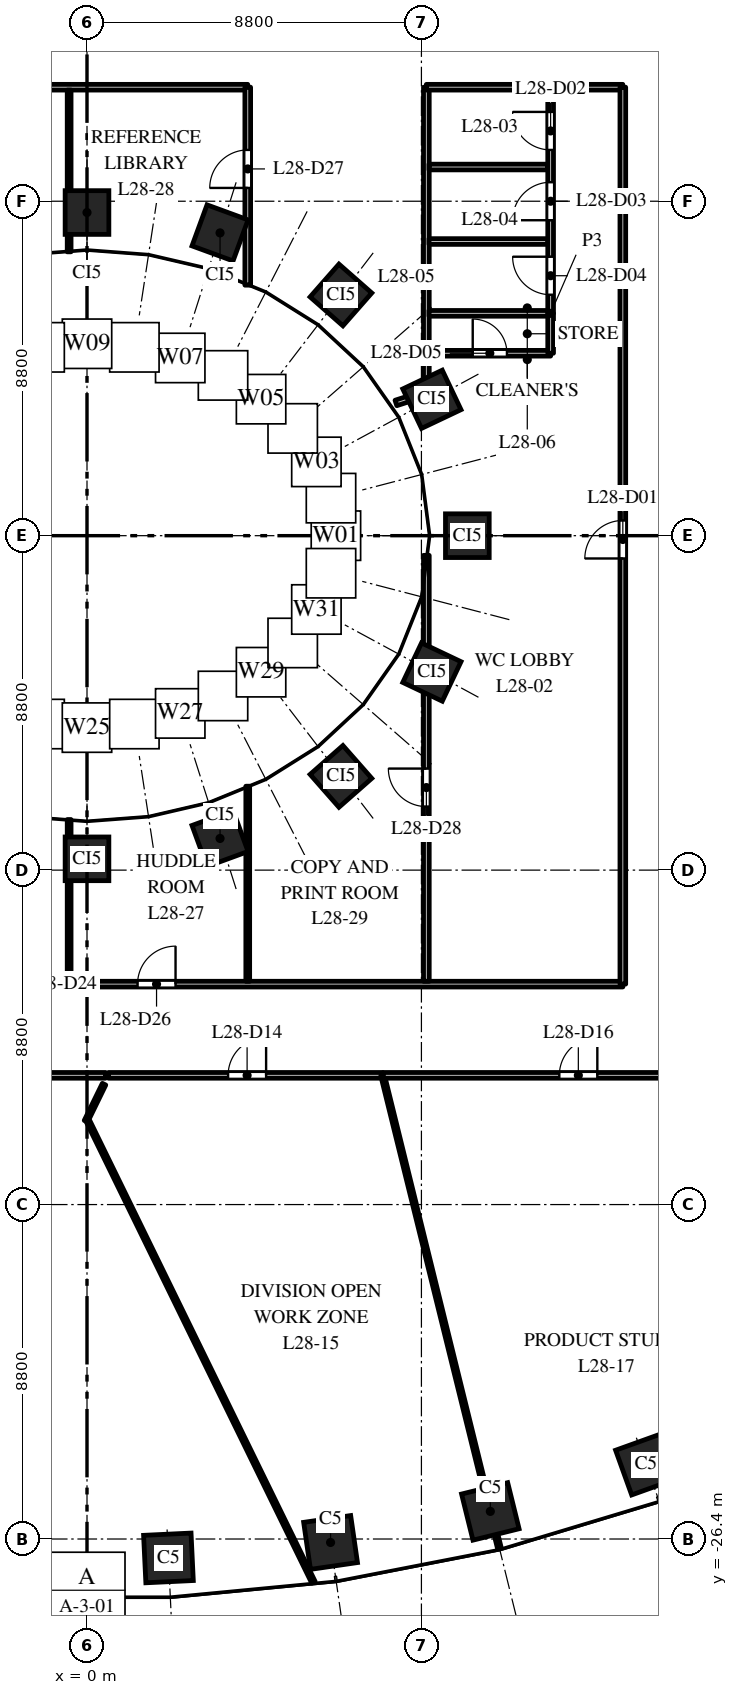
"""IFC4 building model, lengths in metres.
Left out: names, types, materials, properties, quantities, classifications, styles, units other than length and angle.
Written with IfcOpenShell. Run it as: python <this file> out.ifc"""

import sys

from ifc_helpers import new_model, si_unit, direction, frame, frame_2d, origin, origin_2d, place, context, subcontext, project, spatial, rectangle, extrude, element, fill, save


model = new_model("IFC4")
c1 = context("Model", 3, precision=1e-05, world=origin(), true_north=direction((0.0, 1.0)))
c2 = subcontext(c1, "Body", "Model", "MODEL_VIEW")
j1 = project(units=[si_unit("LENGTHUNIT", "METRE"), si_unit("PLANEANGLEUNIT", "RADIAN")], contexts=[c1])
p1 = place(None, origin())
s1 = spatial("IfcSite", under=j1, at=p1, CompositionType="ELEMENT")
p2 = place(p1, origin())
s2 = spatial("IfcBuilding", under=s1, at=p2, CompositionType="ELEMENT")
p3 = place(p2, frame((0.0, 0.0, 124.0)))
s3 = spatial("IfcBuildingStorey", under=s2, at=p3, CompositionType="ELEMENT", Elevation=124.0)
for number, where, z_axis, x_axis in (
    (1, (2.143, -26.898, 0.0), (0.0, 0.0, 1.0), (0.999, 0.048, 0.0)),
    (2, (6.409, -26.491, 0.0), (0.0, 0.0, 1.0), (0.99, 0.143, 0.0)),
    (3, (10.613, -25.674, 0.0), (0.0, 0.0, 1.0), (0.971, 0.24, 0.0)),
    (4, (14.709, -24.441, 0.0), (0.0, 0.0, 1.0), (0.941, 0.338, 0.0)),
):
    element("IfcColumn", number, at=place(p3, frame(where, z_axis=z_axis, x_axis=x_axis)), inside=s3, PredefinedType="COLUMN", context=c2, shape_type="SweptSolid", body=[
        extrude(rectangle(XDim=1.25, YDim=1.25, at=origin_2d()), origin(), (0.0, 0.0, 1.0), 4.0),
    ])
for number, where, z_axis, x_axis in (
    (5, (10.008, 0.0, 0.0), (0.0, 0.0, 1.0), (0.0, 1.0, 0.0)),
    (6, (9.076, 3.588, 0.0), (0.0, 0.0, 1.0), (-0.429, 0.903, 0.0)),
    (7, (6.682, 6.334, 0.0), (0.0, 0.0, 1.0), (-0.751, 0.66, 0.0)),
    (8, (3.501, 7.967, 0.0), (0.0, 0.0, 1.0), (-0.939, 0.344, 0.0)),
    (9, (0.0, 8.503, 0.0), (0.0, 0.0, 1.0), (-1.0, 0.0, 0.0)),
    (10, (0.0, -8.503, 0.0), (0.0, 0.0, 1.0), (1.0, 0.0, 0.0)),
    (11, (3.501, -7.967, 0.0), (0.0, 0.0, 1.0), (0.939, 0.344, 0.0)),
    (12, (6.682, -6.334, 0.0), (0.0, 0.0, 1.0), (0.751, 0.66, 0.0)),
    (13, (9.076, -3.588, 0.0), (0.0, 0.0, 1.0), (0.429, 0.903, 0.0)),
):
    element("IfcColumn", number, at=place(p3, frame(where, z_axis=z_axis, x_axis=x_axis)), inside=s3, PredefinedType="COLUMN", context=c2, shape_type="SweptSolid", body=[
        extrude(rectangle(XDim=1.15, YDim=1.15, at=origin_2d()), origin(), (0.0, 0.0, 1.0), 4.0),
    ])
p4 = place(p3, frame((-14.1, -11.8, 0.0), z_axis=(0.0, 0.0, 1.0), x_axis=(1.0, 0.0, 0.0)))
e14 = element("IfcWall", 14, at=p4, inside=s3, PredefinedType="PARTITIONING", context=c2, shape_type="SweptSolid", body=[
    extrude(rectangle(XDim=28.2, YDim=0.15, at=frame_2d((14.1, 0.0))), origin(), (0.0, 0.0, 1.0), 2.85),
])
p5 = place(p4, frame((6.03, 0.0, 0.0)))
e15 = element("IfcOpeningElement", 15, at=p5, cuts=e14, PredefinedType="OPENING", context=c2, shape_type="SweptSolid", body=[
    extrude(rectangle(XDim=1.0, YDim=2.1, at=frame_2d((0.5, 1.05))), frame((0.0, 0.085, 0.0), z_axis=(0.0, -1.0, 0.0), x_axis=(1.0, 0.0, 0.0)), (0.0, 0.0, 1.0), 0.17),
])
p6 = place(p4, frame((10.73, 0.0, 0.0)))
e16 = element("IfcOpeningElement", 16, at=p6, cuts=e14, PredefinedType="OPENING", context=c2, shape_type="SweptSolid", body=[
    extrude(rectangle(XDim=1.0, YDim=2.1, at=frame_2d((0.5, 1.05))), frame((0.0, 0.085, 0.0), z_axis=(0.0, -1.0, 0.0), x_axis=(1.0, 0.0, 0.0)), (0.0, 0.0, 1.0), 0.17),
])
p7 = place(p4, frame((15.43, 0.0, 0.0)))
e17 = element("IfcOpeningElement", 17, at=p7, cuts=e14, PredefinedType="OPENING", context=c2, shape_type="SweptSolid", body=[
    extrude(rectangle(XDim=1.0, YDim=2.1, at=frame_2d((0.5, 1.05))), frame((0.0, 0.085, 0.0), z_axis=(0.0, -1.0, 0.0), x_axis=(1.0, 0.0, 0.0)), (0.0, 0.0, 1.0), 0.17),
])
p8 = place(p3, frame((-14.1, 11.8, 0.0), z_axis=(0.0, 0.0, 1.0), x_axis=(1.0, 0.0, 0.0)))
e18 = element("IfcWall", 18, at=p8, inside=s3, PredefinedType="PARTITIONING", context=c2, shape_type="SweptSolid", body=[
    extrude(rectangle(XDim=18.33, YDim=0.15, at=frame_2d((9.165, 0.0))), origin(), (0.0, 0.0, 1.0), 2.85),
])
p9 = place(p8, frame((10.83, 0.0, 0.0)))
e19 = element("IfcOpeningElement", 19, at=p9, cuts=e18, PredefinedType="OPENING", context=c2, shape_type="SweptSolid", body=[
    extrude(rectangle(XDim=1.0, YDim=2.1, at=frame_2d((0.5, 1.05))), frame((0.0, 0.085, 0.0), z_axis=(0.0, -1.0, 0.0), x_axis=(1.0, 0.0, 0.0)), (0.0, 0.0, 1.0), 0.17),
])
p10 = place(p3, frame((-10.974, -14.2, 0.0), z_axis=(0.0, 0.0, 1.0), x_axis=(1.0, 0.0, 0.0)))
e20 = element("IfcWall", 20, at=p10, inside=s3, PredefinedType="PARTITIONING", context=c2, shape_type="SweptSolid", body=[
    extrude(rectangle(XDim=11.462, YDim=0.15, at=frame_2d((5.731, 0.0))), origin(), (0.0, 0.0, 1.0), 2.85),
])
p11 = place(p10, frame((7.913, 0.0, 0.0)))
e21 = element("IfcOpeningElement", 21, at=p11, cuts=e20, PredefinedType="OPENING", context=c2, shape_type="SweptSolid", body=[
    extrude(rectangle(XDim=1.0, YDim=2.1, at=frame_2d((0.5, 1.05))), frame((0.0, 0.085, 0.0), z_axis=(0.0, -1.0, 0.0), x_axis=(1.0, 0.0, 0.0)), (0.0, 0.0, 1.0), 0.17),
])
p12 = place(p10, frame((2.835, 0.0, 0.0)))
e22 = element("IfcOpeningElement", 22, at=p12, cuts=e20, PredefinedType="OPENING", context=c2, shape_type="SweptSolid", body=[
    extrude(rectangle(XDim=1.0, YDim=2.1, at=frame_2d((0.5, 1.05))), frame((0.0, 0.085, 0.0), z_axis=(0.0, -1.0, 0.0), x_axis=(1.0, 0.0, 0.0)), (0.0, 0.0, 1.0), 0.17),
])
for number, where, z_axis, x_axis in (
    (23, (-0.47, -11.725, 0.0), (0.0, 0.0, 1.0), (0.0, 1.0, 0.0)),
    (24, (-0.47, 7.469, 0.0), (0.0, 0.0, 1.0), (0.0, 1.0, 0.0)),
):
    element("IfcWall", number, at=place(p3, frame(where, z_axis=z_axis, x_axis=x_axis)), inside=s3, PredefinedType="PARTITIONING", context=c2, shape_type="SweptSolid", body=[
        extrude(rectangle(XDim=4.256, YDim=0.1, at=frame_2d((2.128, 0.0))), origin(), (0.0, 0.0, 1.0), 2.9),
    ])
p13 = place(p3, frame((-0.028, -15.409, 0.0), z_axis=(0.0, 0.0, 1.0), x_axis=(0.438750971543, 0.898608694021, 0.0)))
e25 = element("IfcWall", 25, at=p13, inside=s3, PredefinedType="PARTITIONING", context=c2, shape_type="SweptSolid", body=[
    extrude(rectangle(XDim=1.087, YDim=0.1, at=frame_2d((0.544, 0.0))), origin(), (0.0, 0.0, 1.0), 3.7),
])
p14 = place(p3, frame((0.028, -15.409, 0.0), z_axis=(0.0, 0.0, 1.0), x_axis=(0.439217591491, -0.898380714021, 0.0)))
e26 = element("IfcWall", 26, at=p14, inside=s3, PredefinedType="PARTITIONING", context=c2, shape_type="SweptSolid", body=[
    extrude(rectangle(XDim=13.501, YDim=0.1, at=frame_2d((6.75, 0.0))), origin(), (0.0, 0.0, 1.0), 2.9),
])
p15 = place(p3, frame((0.563, -14.2, 0.0), z_axis=(0.0, 0.0, 1.0), x_axis=(1.0, 0.0, 0.0)))
e27 = element("IfcWall", 27, at=p15, inside=s3, PredefinedType="PARTITIONING", context=c2, shape_type="SweptSolid", body=[
    extrude(rectangle(XDim=7.216, YDim=0.15, at=frame_2d((3.608, 0.0))), origin(), (0.0, 0.0, 1.0), 2.85),
])
p16 = place(p15, frame((3.15, 0.0, 0.0)))
e28 = element("IfcOpeningElement", 28, at=p16, cuts=e27, PredefinedType="OPENING", context=c2, shape_type="SweptSolid", body=[
    extrude(rectangle(XDim=1.0, YDim=2.1, at=frame_2d((0.5, 1.05))), frame((0.0, 0.085, 0.0), z_axis=(0.0, -1.0, 0.0), x_axis=(1.0, 0.0, 0.0)), (0.0, 0.0, 1.0), 0.17),
])
p17 = place(p3, frame((4.23, -11.725, 0.0), z_axis=(0.0, 0.0, 1.0), x_axis=(0.0, 1.0, 0.0)))
e29 = element("IfcWall", 29, at=p17, inside=s3, PredefinedType="PARTITIONING", context=c2, shape_type="SweptSolid", body=[
    extrude(rectangle(XDim=5.133, YDim=0.1, at=frame_2d((2.566, 0.0))), origin(), (0.0, 0.0, 1.0), 2.9),
])
p18 = place(p3, frame((4.23, 6.592, 0.0), z_axis=(0.0, 0.0, 1.0), x_axis=(0.0, 1.0, 0.0)))
e30 = element("IfcWall", 30, at=p18, inside=s3, PredefinedType="PARTITIONING", context=c2, shape_type="SweptSolid", body=[
    extrude(rectangle(XDim=5.208, YDim=0.15, at=frame_2d((2.604, 0.0))), origin(), (0.0, 0.0, 1.0), 2.9),
])
p19 = place(p18, frame((2.558, 0.0, 0.0)))
e31 = element("IfcOpeningElement", 31, at=p19, cuts=e30, PredefinedType="OPENING", context=c2, shape_type="SweptSolid", body=[
    extrude(rectangle(XDim=1.0, YDim=2.1, at=frame_2d((0.5, 1.05))), frame((0.0, 0.085, 0.0), z_axis=(0.0, -1.0, 0.0), x_axis=(1.0, 0.0, 0.0)), (0.0, 0.0, 1.0), 0.17),
])
p20 = place(p3, frame((7.779, -14.2, 0.0), z_axis=(0.0, 0.0, 1.0), x_axis=(0.239778914736, -0.970827519206, 0.0)))
e32 = element("IfcWall", 32, at=p20, inside=s3, PredefinedType="PARTITIONING", context=c2, shape_type="SweptSolid", body=[
    extrude(rectangle(XDim=12.82, YDim=0.1, at=frame_2d((6.41, 0.0))), origin(), (0.0, 0.0, 1.0), 2.9),
])
p21 = place(p3, frame((7.796, -14.2, 0.0), z_axis=(0.0, 0.0, 1.0), x_axis=(1.0, 0.0, 0.0)))
e33 = element("IfcWall", 33, at=p21, inside=s3, PredefinedType="PARTITIONING", context=c2, shape_type="SweptSolid", body=[
    extrude(rectangle(XDim=17.204, YDim=0.15, at=frame_2d((8.602, 0.0))), origin(), (0.0, 0.0, 1.0), 2.85),
])
p22 = place(p21, frame((4.633, 0.0, 0.0)))
e34 = element("IfcOpeningElement", 34, at=p22, cuts=e33, PredefinedType="OPENING", context=c2, shape_type="SweptSolid", body=[
    extrude(rectangle(XDim=1.0, YDim=2.1, at=frame_2d((0.5, 1.05))), frame((0.0, 0.085, 0.0), z_axis=(0.0, -1.0, 0.0), x_axis=(1.0, 0.0, 0.0)), (0.0, 0.0, 1.0), 0.17),
])
p23 = place(p3, frame((8.93, -11.725, 0.0), z_axis=(0.0, 0.0, 1.0), x_axis=(0.0, 1.0, 0.0)))
e35 = element("IfcWall", 35, at=p23, inside=s3, PredefinedType="PARTITIONING", context=c2, shape_type="SweptSolid", body=[
    extrude(rectangle(XDim=11.207, YDim=0.15, at=frame_2d((5.604, 0.0))), origin(), (0.0, 0.0, 1.0), 2.75),
])
p24 = place(p23, frame((4.597, 0.0, 0.0)))
e36 = element("IfcOpeningElement", 36, at=p24, cuts=e35, PredefinedType="OPENING", context=c2, shape_type="SweptSolid", body=[
    extrude(rectangle(XDim=1.0, YDim=2.1, at=frame_2d((0.5, 1.05))), frame((0.0, 0.085, 0.0), z_axis=(0.0, -1.0, 0.0), x_axis=(1.0, 0.0, 0.0)), (0.0, 0.0, 1.0), 0.17),
])
p25 = place(p3, frame((8.93, 3.879, 0.0), z_axis=(0.0, 0.0, 1.0), x_axis=(0.0, 1.0, 0.0)))
e37 = element("IfcWall", 37, at=p25, inside=s3, PredefinedType="PARTITIONING", context=c2, shape_type="SweptSolid", body=[
    extrude(rectangle(XDim=7.921, YDim=0.15, at=frame_2d((3.96, 0.0))), origin(), (0.0, 0.0, 1.0), 2.75),
])
p26 = place(p3, frame((8.93, 11.8, 0.0), z_axis=(0.0, 0.0, 1.0), x_axis=(1.0, 0.0, 0.0)))
e38 = element("IfcWall", 38, at=p26, inside=s3, PredefinedType="PARTITIONING", context=c2, shape_type="SweptSolid", body=[
    extrude(rectangle(XDim=5.17, YDim=0.15, at=frame_2d((2.585, 0.0))), origin(), (0.0, 0.0, 1.0), 3.7),
])
p27 = place(p3, frame((9.0, 5.85, 0.0), z_axis=(0.0, 0.0, 1.0), x_axis=(1.0, 0.0, 0.0)))
e39 = element("IfcWall", 39, at=p27, inside=s3, PredefinedType="PARTITIONING", context=c2, shape_type="SweptSolid", body=[
    extrude(rectangle(XDim=3.2, YDim=0.15, at=frame_2d((1.6, 0.0))), origin(), (0.0, 0.0, 1.0), 2.75),
])
for number, where, z_axis, x_axis in (
    (40, (9.0, 7.74, 0.0), (0.0, 0.0, 1.0), (1.0, 0.0, 0.0)),
    (41, (9.0, 9.7, 0.0), (0.0, 0.0, 1.0), (1.0, 0.0, 0.0)),
):
    element("IfcWall", number, at=place(p3, frame(where, z_axis=z_axis, x_axis=x_axis)), inside=s3, PredefinedType="PARTITIONING", context=c2, shape_type="SweptSolid", body=[
        extrude(rectangle(XDim=3.125, YDim=0.15, at=frame_2d((1.562, 0.0))), origin(), (0.0, 0.0, 1.0), 3.7),
    ])
p28 = place(p3, frame((9.004, 4.8, 0.0), z_axis=(0.0, 0.0, 1.0), x_axis=(1.0, 0.0, 0.0)))
e42 = element("IfcWall", 42, at=p28, inside=s3, PredefinedType="PARTITIONING", context=c2, shape_type="SweptSolid", body=[
    extrude(rectangle(XDim=3.196, YDim=0.15, at=frame_2d((1.598, 0.0))), origin(), (0.0, 0.0, 1.0), 2.75),
])
p29 = place(p28, frame((1.146, 0.0, 0.0)))
e43 = element("IfcOpeningElement", 43, at=p29, cuts=e42, PredefinedType="OPENING", context=c2, shape_type="SweptSolid", body=[
    extrude(rectangle(XDim=0.9, YDim=2.1, at=frame_2d((0.45, 1.05))), frame((0.0, 0.085, 0.0), z_axis=(0.0, -1.0, 0.0), x_axis=(1.0, 0.0, 0.0)), (0.0, 0.0, 1.0), 0.17),
])
p30 = place(p3, frame((12.2, 4.8, 0.0), z_axis=(0.0, 0.0, 1.0), x_axis=(0.0, 1.0, 0.0)))
e44 = element("IfcWall", 44, at=p30, inside=s3, PredefinedType="PARTITIONING", context=c2, shape_type="SweptSolid", body=[
    extrude(rectangle(XDim=1.05, YDim=0.15, at=frame_2d((0.525, 0.0))), origin(), (0.0, 0.0, 1.0), 3.7),
])
p31 = place(p3, frame((12.2, 5.85, 0.0), z_axis=(0.0, 0.0, 1.0), x_axis=(0.0, 1.0, 0.0)))
e45 = element("IfcWall", 45, at=p31, inside=s3, PredefinedType="PARTITIONING", context=c2, shape_type="SweptSolid", body=[
    extrude(rectangle(XDim=5.875, YDim=0.15, at=frame_2d((2.938, 0.0))), origin(), (0.0, 0.0, 1.0), 2.75),
])
p32 = place(p31, frame((4.3, 0.0, 0.0)))
e46 = element("IfcOpeningElement", 46, at=p32, cuts=e45, PredefinedType="OPENING", context=c2, shape_type="SweptSolid", body=[
    extrude(rectangle(XDim=1.0, YDim=2.1, at=frame_2d((0.5, 1.05))), frame((0.0, 0.085, 0.0), z_axis=(0.0, -1.0, 0.0), x_axis=(1.0, 0.0, 0.0)), (0.0, 0.0, 1.0), 0.17),
])
p33 = place(p31, frame((2.45, 0.0, 0.0)))
e47 = element("IfcOpeningElement", 47, at=p33, cuts=e45, PredefinedType="OPENING", context=c2, shape_type="SweptSolid", body=[
    extrude(rectangle(XDim=1.0, YDim=2.1, at=frame_2d((0.5, 1.05))), frame((0.0, 0.085, 0.0), z_axis=(0.0, -1.0, 0.0), x_axis=(1.0, 0.0, 0.0)), (0.0, 0.0, 1.0), 0.17),
])
p34 = place(p31, frame((0.49, 0.0, 0.0)))
e48 = element("IfcOpeningElement", 48, at=p34, cuts=e45, PredefinedType="OPENING", context=c2, shape_type="SweptSolid", body=[
    extrude(rectangle(XDim=1.0, YDim=2.1, at=frame_2d((0.5, 1.05))), frame((0.0, 0.085, 0.0), z_axis=(0.0, -1.0, 0.0), x_axis=(1.0, 0.0, 0.0)), (0.0, 0.0, 1.0), 0.17),
])
p35 = place(p3, frame((14.1, -11.8, 0.0), z_axis=(0.0, 0.0, 1.0), x_axis=(0.0, 1.0, 0.0)))
e49 = element("IfcWall", 49, at=p35, inside=s3, PredefinedType="PARTITIONING", context=c2, shape_type="SweptSolid", body=[
    extrude(rectangle(XDim=23.6, YDim=0.15, at=frame_2d((11.8, 0.0))), origin(), (0.0, 0.0, 1.0), 2.75),
])
p36 = place(p35, frame((11.2, 0.0, 0.0)))
e50 = element("IfcOpeningElement", 50, at=p36, cuts=e49, PredefinedType="OPENING", context=c2, shape_type="SweptSolid", body=[
    extrude(rectangle(XDim=1.0, YDim=2.1, at=frame_2d((0.5, 1.05))), frame((0.0, 0.085, 0.0), z_axis=(0.0, -1.0, 0.0), x_axis=(1.0, 0.0, 0.0)), (0.0, 0.0, 1.0), 0.17),
])
p37 = place(p3, frame((8.884, 3.736, 0.0), z_axis=(0.0, 0.0, 1.0), x_axis=(-0.951505448118, -0.307631893992, 0.0)))
e51 = element("IfcWall", 51, at=p37, inside=s3, PredefinedType="PARTITIONING", context=c2, shape_type="SweptSolid", body=[
    extrude(rectangle(XDim=0.794, YDim=0.15, at=frame_2d((0.397, 0.0))), origin(), (0.0, 0.0, 1.0), 2.9),
])
p38 = place(p36, origin())
e52 = element("IfcDoor", 52, at=p38, inside=s3, OperationType="SINGLE_SWING_LEFT", PredefinedType="DOOR", context=c2, shape_type="SweptSolid", body=[
    extrude(rectangle(XDim=1.0, YDim=2.1, at=frame_2d((0.5, 1.05))), frame((0.0, 0.025, 0.0), z_axis=(0.0, -1.0, 0.0), x_axis=(1.0, 0.0, 0.0)), (0.0, 0.0, 1.0), 0.05),
])
fill(e50, e52)
p39 = place(p32, origin())
e53 = element("IfcDoor", 53, at=p39, inside=s3, OperationType="SINGLE_SWING_RIGHT", PredefinedType="DOOR", context=c2, shape_type="SweptSolid", body=[
    extrude(rectangle(XDim=1.0, YDim=2.1, at=frame_2d((0.5, 1.05))), frame((0.0, 0.025, 0.0), z_axis=(0.0, -1.0, 0.0), x_axis=(1.0, 0.0, 0.0)), (0.0, 0.0, 1.0), 0.05),
])
fill(e46, e53)
p40 = place(p33, origin())
e54 = element("IfcDoor", 54, at=p40, inside=s3, OperationType="SINGLE_SWING_LEFT", PredefinedType="DOOR", context=c2, shape_type="SweptSolid", body=[
    extrude(rectangle(XDim=1.0, YDim=2.1, at=frame_2d((0.5, 1.05))), frame((0.0, 0.025, 0.0), z_axis=(0.0, -1.0, 0.0), x_axis=(1.0, 0.0, 0.0)), (0.0, 0.0, 1.0), 0.05),
])
fill(e47, e54)
p41 = place(p34, origin())
e55 = element("IfcDoor", 55, at=p41, inside=s3, OperationType="SINGLE_SWING_RIGHT", PredefinedType="DOOR", context=c2, shape_type="SweptSolid", body=[
    extrude(rectangle(XDim=1.0, YDim=2.1, at=frame_2d((0.5, 1.05))), frame((0.0, 0.025, 0.0), z_axis=(0.0, -1.0, 0.0), x_axis=(1.0, 0.0, 0.0)), (0.0, 0.0, 1.0), 0.05),
])
fill(e48, e55)
p42 = place(p29, origin())
e56 = element("IfcDoor", 56, at=p42, inside=s3, OperationType="SINGLE_SWING_LEFT", PredefinedType="DOOR", context=c2, shape_type="SweptSolid", body=[
    extrude(rectangle(XDim=0.9, YDim=2.1, at=frame_2d((0.45, 1.05))), frame((0.0, 0.025, 0.0), z_axis=(0.0, -1.0, 0.0), x_axis=(1.0, 0.0, 0.0)), (0.0, 0.0, 1.0), 0.05),
])
fill(e43, e56)
p43 = place(p16, origin())
e57 = element("IfcDoor", 57, at=p43, inside=s3, OperationType="SINGLE_SWING_RIGHT", PredefinedType="DOOR", context=c2, shape_type="SweptSolid", body=[
    extrude(rectangle(XDim=1.0, YDim=2.1, at=frame_2d((0.5, 1.05))), frame((0.0, 0.025, 0.0), z_axis=(0.0, -1.0, 0.0), x_axis=(1.0, 0.0, 0.0)), (0.0, 0.0, 1.0), 0.05),
])
fill(e28, e57)
p44 = place(p22, origin())
e58 = element("IfcDoor", 58, at=p44, inside=s3, OperationType="SINGLE_SWING_RIGHT", PredefinedType="DOOR", context=c2, shape_type="SweptSolid", body=[
    extrude(rectangle(XDim=1.0, YDim=2.1, at=frame_2d((0.5, 1.05))), frame((0.0, 0.025, 0.0), z_axis=(0.0, -1.0, 0.0), x_axis=(1.0, 0.0, 0.0)), (0.0, 0.0, 1.0), 0.05),
])
fill(e34, e58)
p45 = place(p7, origin())
e59 = element("IfcDoor", 59, at=p45, inside=s3, OperationType="SINGLE_SWING_RIGHT", PredefinedType="DOOR", context=c2, shape_type="SweptSolid", body=[
    extrude(rectangle(XDim=1.0, YDim=2.1, at=frame_2d((0.5, 1.05))), frame((0.0, 0.025, 0.0), z_axis=(0.0, -1.0, 0.0), x_axis=(1.0, 0.0, 0.0)), (0.0, 0.0, 1.0), 0.05),
])
fill(e17, e59)
p46 = place(p19, origin())
e60 = element("IfcDoor", 60, at=p46, inside=s3, OperationType="SINGLE_SWING_LEFT", PredefinedType="DOOR", context=c2, shape_type="SweptSolid", body=[
    extrude(rectangle(XDim=1.0, YDim=2.1, at=frame_2d((0.5, 1.05))), frame((0.0, 0.025, 0.0), z_axis=(0.0, -1.0, 0.0), x_axis=(1.0, 0.0, 0.0)), (0.0, 0.0, 1.0), 0.05),
])
fill(e31, e60)
p47 = place(p24, origin())
e61 = element("IfcDoor", 61, at=p47, inside=s3, OperationType="SINGLE_SWING_RIGHT", PredefinedType="DOOR", context=c2, shape_type="SweptSolid", body=[
    extrude(rectangle(XDim=1.0, YDim=2.1, at=frame_2d((0.5, 1.05))), frame((0.0, 0.025, 0.0), z_axis=(0.0, -1.0, 0.0), x_axis=(1.0, 0.0, 0.0)), (0.0, 0.0, 1.0), 0.05),
])
fill(e36, e61)
save(model, sys.argv[1])
